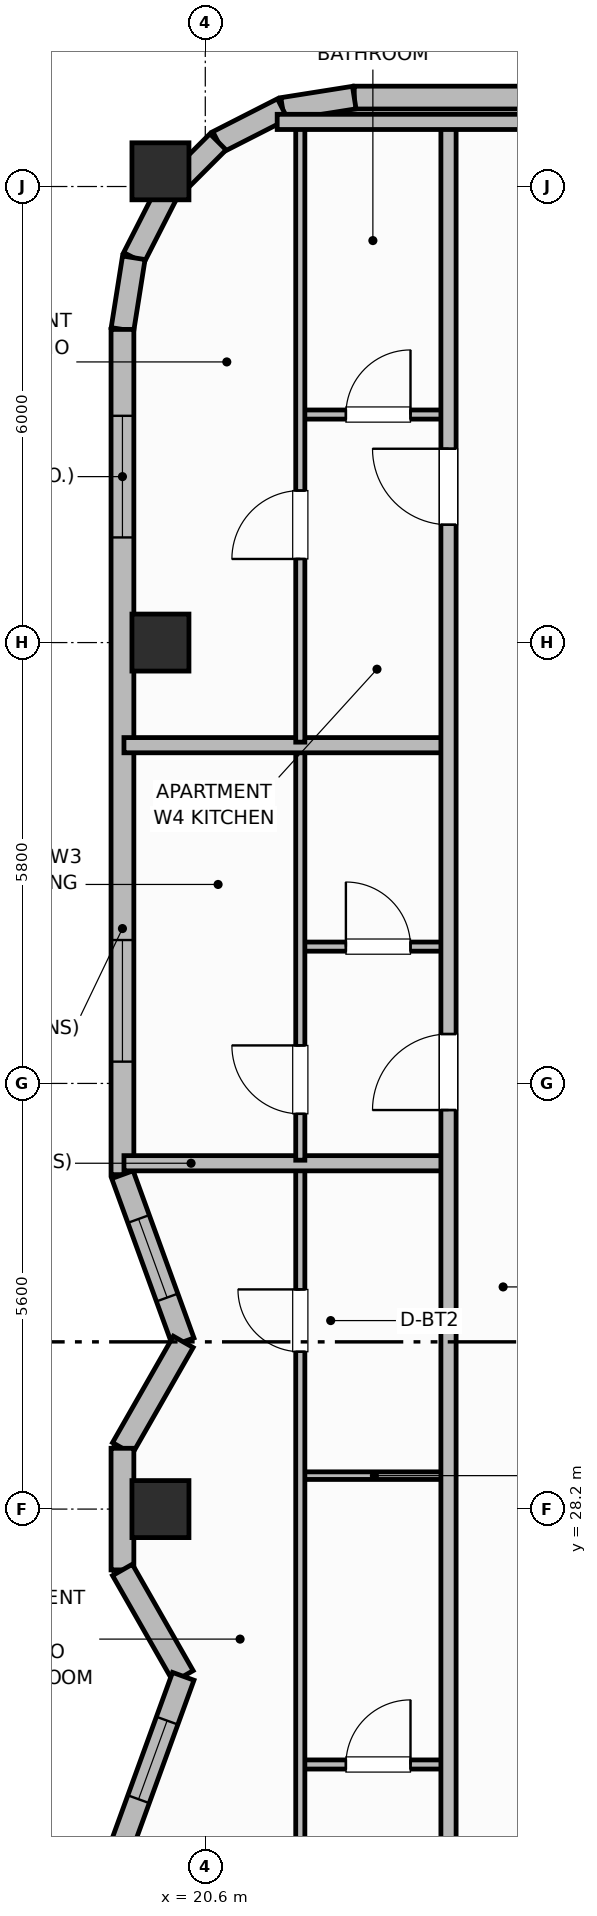
"""IFC4 building model, lengths in metres.
Left out: names, types, materials, properties, quantities, classifications, styles, units other than length and angle.
Written with IfcOpenShell. Run it as: python <this file> out.ifc"""

import sys

from ifc_helpers import new_model, si_unit, direction, frame, frame_2d, origin, origin_2d, place, context, subcontext, project, spatial, rectangle, extrude, element, fill, save


model = new_model("IFC4")
c1 = context("Model", 3, precision=1e-05, world=origin(), true_north=direction((0.0, 1.0)))
c2 = subcontext(c1, "Body", "Model", "MODEL_VIEW")
j1 = project(units=[si_unit("LENGTHUNIT", "METRE"), si_unit("PLANEANGLEUNIT", "RADIAN")], contexts=[c1])
p1 = place(None, origin())
s1 = spatial("IfcSite", under=j1, at=p1, CompositionType="ELEMENT")
p2 = place(p1, origin())
s2 = spatial("IfcBuilding", under=s1, at=p2, CompositionType="ELEMENT")
p3 = place(p2, frame((0.0, 0.0, 267.6)))
s3 = spatial("IfcBuildingStorey", under=s2, at=p3, CompositionType="ELEMENT", Elevation=267.6)
for number, where, z_axis, x_axis in (
    (1, (20.01, 28.2, 0.0), (0.0, 0.0, 1.0), (1.0, 0.0, 0.0)),
    (2, (20.01, 39.6, 0.0), (0.0, 0.0, 1.0), (1.0, 0.0, 0.0)),
    (3, (20.01, 45.8, 0.0), (0.0, 0.0, 1.0), (1.0, 0.0, 0.0)),
):
    element("IfcColumn", number, at=place(p3, frame(where, z_axis=z_axis, x_axis=x_axis)), inside=s3, PredefinedType="COLUMN", context=c2, shape_type="SweptSolid", body=[
        extrude(rectangle(XDim=0.75, YDim=0.75, at=origin_2d()), origin(), (0.0, 0.0, 1.0), 3.7),
    ])
p4 = place(p3, frame((55.84, 46.77, 0.0), z_axis=(0.0, 0.0, 1.0), x_axis=(-1.0, 0.0, 0.0)))
e4 = element("IfcWall", 4, at=p4, inside=s3, PredefinedType="SOLIDWALL", context=c2, shape_type="SweptSolid", body=[
    extrude(rectangle(XDim=33.28, YDim=0.3, at=frame_2d((16.64, 0.0))), origin(), (0.0, 0.0, 1.0), 2.73),
])
p5 = place(p4, frame((4.547, 0.0, 0.76)))
e5 = element("IfcOpeningElement", 5, at=p5, cuts=e4, PredefinedType="OPENING", context=c2, shape_type="SweptSolid", body=[
    extrude(rectangle(XDim=1.8, YDim=1.85, at=frame_2d((0.9, 0.925))), frame((0.0, 0.16, 0.0), z_axis=(0.0, -1.0, 0.0), x_axis=(1.0, 0.0, 0.0)), (0.0, 0.0, 1.0), 0.32),
])
p6 = place(p4, frame((7.745, 0.0, 0.76)))
e6 = element("IfcOpeningElement", 6, at=p6, cuts=e4, PredefinedType="OPENING", context=c2, shape_type="SweptSolid", body=[
    extrude(rectangle(XDim=1.8, YDim=1.85, at=frame_2d((0.9, 0.925))), frame((0.0, 0.16, 0.0), z_axis=(0.0, -1.0, 0.0), x_axis=(1.0, 0.0, 0.0)), (0.0, 0.0, 1.0), 0.32),
])
p7 = place(p4, frame((14.141, 0.0, 0.76)))
e7 = element("IfcOpeningElement", 7, at=p7, cuts=e4, PredefinedType="OPENING", context=c2, shape_type="SweptSolid", body=[
    extrude(rectangle(XDim=1.8, YDim=1.85, at=frame_2d((0.9, 0.925))), frame((0.0, 0.16, 0.0), z_axis=(0.0, -1.0, 0.0), x_axis=(1.0, 0.0, 0.0)), (0.0, 0.0, 1.0), 0.32),
])
p8 = place(p4, frame((17.339, 0.0, 0.76)))
e8 = element("IfcOpeningElement", 8, at=p8, cuts=e4, PredefinedType="OPENING", context=c2, shape_type="SweptSolid", body=[
    extrude(rectangle(XDim=1.8, YDim=1.85, at=frame_2d((0.9, 0.925))), frame((0.0, 0.16, 0.0), z_axis=(0.0, -1.0, 0.0), x_axis=(1.0, 0.0, 0.0)), (0.0, 0.0, 1.0), 0.32),
])
p9 = place(p4, frame((23.735, 0.0, 0.76)))
e9 = element("IfcOpeningElement", 9, at=p9, cuts=e4, PredefinedType="OPENING", context=c2, shape_type="SweptSolid", body=[
    extrude(rectangle(XDim=1.8, YDim=1.85, at=frame_2d((0.9, 0.925))), frame((0.0, 0.16, 0.0), z_axis=(0.0, -1.0, 0.0), x_axis=(1.0, 0.0, 0.0)), (0.0, 0.0, 1.0), 0.32),
])
p10 = place(p4, frame((26.933, 0.0, 0.76)))
e10 = element("IfcOpeningElement", 10, at=p10, cuts=e4, PredefinedType="OPENING", context=c2, shape_type="SweptSolid", body=[
    extrude(rectangle(XDim=1.8, YDim=1.85, at=frame_2d((0.9, 0.925))), frame((0.0, 0.16, 0.0), z_axis=(0.0, -1.0, 0.0), x_axis=(1.0, 0.0, 0.0)), (0.0, 0.0, 1.0), 0.32),
])
p11 = place(p3, frame((22.56, 46.77, 0.0), z_axis=(0.0, 0.0, 1.0), x_axis=(-0.987669453596, -0.156553666304, 0.0)))
e11 = element("IfcWall", 11, at=p11, inside=s3, PredefinedType="SOLIDWALL", context=c2, shape_type="SweptSolid", body=[
    extrude(rectangle(XDim=0.954, YDim=0.3, at=frame_2d((0.477, 0.0))), origin(), (0.0, 0.0, 1.0), 2.73),
])
p12 = place(p3, frame((21.617, 46.621, 0.0), z_axis=(0.0, 0.0, 1.0), x_axis=(-0.891023873617, -0.45395644796, 0.0)))
e12 = element("IfcWall", 12, at=p12, inside=s3, PredefinedType="SOLIDWALL", context=c2, shape_type="SweptSolid", body=[
    extrude(rectangle(XDim=0.954, YDim=0.3, at=frame_2d((0.477, 0.0))), origin(), (0.0, 0.0, 1.0), 2.73),
])
p13 = place(p3, frame((20.767, 46.188, 0.0), z_axis=(0.0, 0.0, 1.0), x_axis=(-0.707106781187, -0.707106781187, 0.0)))
e13 = element("IfcWall", 13, at=p13, inside=s3, PredefinedType="SOLIDWALL", context=c2, shape_type="SweptSolid", body=[
    extrude(rectangle(XDim=0.954, YDim=0.3, at=frame_2d((0.477, 0.0))), origin(), (0.0, 0.0, 1.0), 2.73),
])
p14 = place(p3, frame((20.093, 45.513, 0.0), z_axis=(0.0, 0.0, 1.0), x_axis=(-0.454159573051, -0.890920356825, 0.0)))
e14 = element("IfcWall", 14, at=p14, inside=s3, PredefinedType="SOLIDWALL", context=c2, shape_type="SweptSolid", body=[
    extrude(rectangle(XDim=0.954, YDim=0.3, at=frame_2d((0.477, 0.0))), origin(), (0.0, 0.0, 1.0), 2.73),
])
p15 = place(p3, frame((19.659, 44.663, 0.0), z_axis=(0.0, 0.0, 1.0), x_axis=(-0.156304114255, -0.987708977314, 0.0)))
e15 = element("IfcWall", 15, at=p15, inside=s3, PredefinedType="SOLIDWALL", context=c2, shape_type="SweptSolid", body=[
    extrude(rectangle(XDim=0.954, YDim=0.3, at=frame_2d((0.477, 0.0))), origin(), (0.0, 0.0, 1.0), 2.73),
])
p16 = place(p3, frame((19.51, 43.72, 0.0), z_axis=(0.0, 0.0, 1.0), x_axis=(0.0, -1.0, 0.0)))
e16 = element("IfcWall", 16, at=p16, inside=s3, PredefinedType="SOLIDWALL", context=c2, shape_type="SweptSolid", body=[
    extrude(rectangle(XDim=11.12, YDim=0.3, at=frame_2d((5.56, 0.0))), origin(), (0.0, 0.0, 1.0), 2.73),
])
p17 = place(p16, frame((1.137, 0.0, 0.71)))
e17 = element("IfcOpeningElement", 17, at=p17, cuts=e16, PredefinedType="OPENING", context=c2, shape_type="SweptSolid", body=[
    extrude(rectangle(XDim=1.6, YDim=1.9, at=frame_2d((0.8, 0.95))), frame((0.0, 0.16, 0.0), z_axis=(0.0, -1.0, 0.0), x_axis=(1.0, 0.0, 0.0)), (0.0, 0.0, 1.0), 0.32),
])
p18 = place(p16, frame((8.033, 0.0, 0.71)))
e18 = element("IfcOpeningElement", 18, at=p18, cuts=e16, PredefinedType="OPENING", context=c2, shape_type="SweptSolid", body=[
    extrude(rectangle(XDim=1.6, YDim=1.9, at=frame_2d((0.8, 0.95))), frame((0.0, 0.16, 0.0), z_axis=(0.0, -1.0, 0.0), x_axis=(1.0, 0.0, 0.0)), (0.0, 0.0, 1.0), 0.32),
])
p19 = place(p3, frame((19.51, 32.6, 0.0), z_axis=(0.0, 0.0, 1.0), x_axis=(0.341734690003, -0.939796468204, 0.0)))
e19 = element("IfcWall", 19, at=p19, inside=s3, PredefinedType="SOLIDWALL", context=c2, shape_type="SweptSolid", body=[
    extrude(rectangle(XDim=2.341, YDim=0.3, at=frame_2d((1.17, 0.0))), origin(), (0.0, 0.0, 1.0), 2.73),
])
p20 = place(p19, frame((0.621, 0.0, 0.92)))
e20 = element("IfcOpeningElement", 20, at=p20, cuts=e19, PredefinedType="OPENING", context=c2, shape_type="SweptSolid", body=[
    extrude(rectangle(XDim=1.1, YDim=1.65, at=frame_2d((0.55, 0.825))), frame((0.0, 0.16, 0.0), z_axis=(0.0, -1.0, 0.0), x_axis=(1.0, 0.0, 0.0)), (0.0, 0.0, 1.0), 0.32),
])
p21 = place(p3, frame((20.31, 30.4, 0.0), z_axis=(0.0, 0.0, 1.0), x_axis=(-0.496187856351, -0.868215187157, 0.0)))
e21 = element("IfcWall", 21, at=p21, inside=s3, PredefinedType="SOLIDWALL", context=c2, shape_type="SweptSolid", body=[
    extrude(rectangle(XDim=1.612, YDim=0.3, at=frame_2d((0.806, 0.0))), origin(), (0.0, 0.0, 1.0), 2.73),
])
p22 = place(p3, frame((19.51, 29.0, 0.0), z_axis=(0.0, 0.0, 1.0), x_axis=(0.0, -1.0, 0.0)))
e22 = element("IfcWall", 22, at=p22, inside=s3, PredefinedType="SOLIDWALL", context=c2, shape_type="SweptSolid", body=[
    extrude(rectangle(XDim=1.6, YDim=0.3, at=frame_2d((0.8, 0.0))), origin(), (0.0, 0.0, 1.0), 2.73),
])
p23 = place(p3, frame((19.51, 27.4, 0.0), z_axis=(0.0, 0.0, 1.0), x_axis=(0.496187856351, -0.868215187157, 0.0)))
e23 = element("IfcWall", 23, at=p23, inside=s3, PredefinedType="SOLIDWALL", context=c2, shape_type="SweptSolid", body=[
    extrude(rectangle(XDim=1.612, YDim=0.3, at=frame_2d((0.806, 0.0))), origin(), (0.0, 0.0, 1.0), 2.73),
])
p24 = place(p3, frame((20.31, 26.0, 0.0), z_axis=(0.0, 0.0, 1.0), x_axis=(-0.341768184638, -0.939784287999, 0.0)))
e24 = element("IfcWall", 24, at=p24, inside=s3, PredefinedType="SOLIDWALL", context=c2, shape_type="SweptSolid", body=[
    extrude(rectangle(XDim=2.341, YDim=0.3, at=frame_2d((1.17, 0.0))), origin(), (0.0, 0.0, 1.0), 2.73),
])
p25 = place(p24, frame((0.621, 0.0, 0.92)))
e25 = element("IfcOpeningElement", 25, at=p25, cuts=e24, PredefinedType="OPENING", context=c2, shape_type="SweptSolid", body=[
    extrude(rectangle(XDim=1.1, YDim=1.65, at=frame_2d((0.55, 0.825))), frame((0.0, 0.16, 0.0), z_axis=(0.0, -1.0, 0.0), x_axis=(1.0, 0.0, 0.0)), (0.0, 0.0, 1.0), 0.32),
])
p26 = place(p3, frame((21.85, 24.84, 0.0), z_axis=(0.0, 0.0, 1.0), x_axis=(1.0, 0.0, 0.0)))
e26 = element("IfcWall", 26, at=p26, inside=s3, PredefinedType="PARTITIONING", context=c2, shape_type="SweptSolid", body=[
    extrude(rectangle(XDim=1.95, YDim=0.12, at=frame_2d((0.975, 0.0))), origin(), (0.0, 0.0, 1.0), 2.56),
])
p27 = place(p26, frame((0.6, 0.0, 0.0)))
e27 = element("IfcOpeningElement", 27, at=p27, cuts=e26, PredefinedType="OPENING", context=c2, shape_type="SweptSolid", body=[
    extrude(rectangle(XDim=0.85, YDim=2.1, at=frame_2d((0.425, 1.05))), frame((0.0, 0.07, 0.0), z_axis=(0.0, -1.0, 0.0), x_axis=(1.0, 0.0, 0.0)), (0.0, 0.0, 1.0), 0.14),
])
p28 = place(p3, frame((21.85, 28.64, 0.0), z_axis=(0.0, 0.0, 1.0), x_axis=(1.0, 0.0, 0.0)))
e28 = element("IfcWall", 28, at=p28, inside=s3, PredefinedType="PARTITIONING", context=c2, shape_type="SweptSolid", body=[
    extrude(rectangle(XDim=1.95, YDim=0.1, at=frame_2d((0.975, 0.0))), origin(), (0.0, 0.0, 1.0), 2.56),
])
p29 = place(p3, frame((21.85, 19.48, 0.0), z_axis=(0.0, 0.0, 1.0), x_axis=(0.0, 1.0, 0.0)))
e29 = element("IfcWall", 29, at=p29, inside=s3, PredefinedType="PARTITIONING", context=c2, shape_type="SweptSolid", body=[
    extrude(rectangle(XDim=13.23, YDim=0.12, at=frame_2d((6.615, 0.0))), origin(), (0.0, 0.0, 1.0), 2.56),
])
p30 = place(p29, frame((0.61, 0.0, 0.0)))
e30 = element("IfcOpeningElement", 30, at=p30, cuts=e29, PredefinedType="OPENING", context=c2, shape_type="SweptSolid", body=[
    extrude(rectangle(XDim=0.9, YDim=2.1, at=frame_2d((0.45, 1.05))), frame((0.0, 0.07, 0.0), z_axis=(0.0, -1.0, 0.0), x_axis=(1.0, 0.0, 0.0)), (0.0, 0.0, 1.0), 0.14),
])
p31 = place(p29, frame((10.79, 0.0, 0.0)))
e31 = element("IfcOpeningElement", 31, at=p31, cuts=e29, PredefinedType="OPENING", context=c2, shape_type="SweptSolid", body=[
    extrude(rectangle(XDim=0.82, YDim=2.08, at=frame_2d((0.41, 1.04))), frame((0.0, 0.07, 0.0), z_axis=(0.0, -1.0, 0.0), x_axis=(1.0, 0.0, 0.0)), (0.0, 0.0, 1.0), 0.14),
])
p32 = place(p3, frame((19.53, 32.75, 0.0), z_axis=(0.0, 0.0, 1.0), x_axis=(1.0, 0.0, 0.0)))
e32 = element("IfcWall", 32, at=p32, inside=s3, PredefinedType="PARTITIONING", context=c2, shape_type="SweptSolid", body=[
    extrude(rectangle(XDim=4.27, YDim=0.2, at=frame_2d((2.135, 0.0))), origin(), (0.0, 0.0, 1.0), 2.56),
])
p33 = place(p3, frame((21.85, 35.6, 0.0), z_axis=(0.0, 0.0, 1.0), x_axis=(1.0, 0.0, 0.0)))
e33 = element("IfcWall", 33, at=p33, inside=s3, PredefinedType="PARTITIONING", context=c2, shape_type="SweptSolid", body=[
    extrude(rectangle(XDim=1.95, YDim=0.12, at=frame_2d((0.975, 0.0))), origin(), (0.0, 0.0, 1.0), 2.56),
])
p34 = place(p33, frame((0.6, 0.0, 0.0)))
e34 = element("IfcOpeningElement", 34, at=p34, cuts=e33, PredefinedType="OPENING", context=c2, shape_type="SweptSolid", body=[
    extrude(rectangle(XDim=0.85, YDim=2.1, at=frame_2d((0.425, 1.05))), frame((0.0, 0.07, 0.0), z_axis=(0.0, -1.0, 0.0), x_axis=(1.0, 0.0, 0.0)), (0.0, 0.0, 1.0), 0.14),
])
p35 = place(p3, frame((21.85, 32.79, 0.0), z_axis=(0.0, 0.0, 1.0), x_axis=(0.0, 1.0, 0.0)))
e35 = element("IfcWall", 35, at=p35, inside=s3, PredefinedType="PARTITIONING", context=c2, shape_type="SweptSolid", body=[
    extrude(rectangle(XDim=5.42, YDim=0.12, at=frame_2d((2.71, 0.0))), origin(), (0.0, 0.0, 1.0), 2.56),
])
p36 = place(p35, frame((0.61, 0.0, 0.0)))
e36 = element("IfcOpeningElement", 36, at=p36, cuts=e35, PredefinedType="OPENING", context=c2, shape_type="SweptSolid", body=[
    extrude(rectangle(XDim=0.9, YDim=2.1, at=frame_2d((0.45, 1.05))), frame((0.0, 0.07, 0.0), z_axis=(0.0, -1.0, 0.0), x_axis=(1.0, 0.0, 0.0)), (0.0, 0.0, 1.0), 0.14),
])
p37 = place(p3, frame((19.53, 38.25, 0.0), z_axis=(0.0, 0.0, 1.0), x_axis=(1.0, 0.0, 0.0)))
e37 = element("IfcWall", 37, at=p37, inside=s3, PredefinedType="PARTITIONING", context=c2, shape_type="SweptSolid", body=[
    extrude(rectangle(XDim=4.27, YDim=0.2, at=frame_2d((2.135, 0.0))), origin(), (0.0, 0.0, 1.0), 2.56),
])
p38 = place(p3, frame((21.85, 42.6, 0.0), z_axis=(0.0, 0.0, 1.0), x_axis=(1.0, 0.0, 0.0)))
e38 = element("IfcWall", 38, at=p38, inside=s3, PredefinedType="PARTITIONING", context=c2, shape_type="SweptSolid", body=[
    extrude(rectangle(XDim=1.95, YDim=0.12, at=frame_2d((0.975, 0.0))), origin(), (0.0, 0.0, 1.0), 2.56),
])
p39 = place(p38, frame((0.6, 0.0, 0.0)))
e39 = element("IfcOpeningElement", 39, at=p39, cuts=e38, PredefinedType="OPENING", context=c2, shape_type="SweptSolid", body=[
    extrude(rectangle(XDim=0.85, YDim=2.1, at=frame_2d((0.425, 1.05))), frame((0.0, 0.07, 0.0), z_axis=(0.0, -1.0, 0.0), x_axis=(1.0, 0.0, 0.0)), (0.0, 0.0, 1.0), 0.14),
])
p40 = place(p3, frame((21.85, 38.29, 0.0), z_axis=(0.0, 0.0, 1.0), x_axis=(0.0, 1.0, 0.0)))
e40 = element("IfcWall", 40, at=p40, inside=s3, PredefinedType="PARTITIONING", context=c2, shape_type="SweptSolid", body=[
    extrude(rectangle(XDim=8.12, YDim=0.12, at=frame_2d((4.06, 0.0))), origin(), (0.0, 0.0, 1.0), 2.56),
])
p41 = place(p40, frame((2.41, 0.0, 0.0)))
e41 = element("IfcOpeningElement", 41, at=p41, cuts=e40, PredefinedType="OPENING", context=c2, shape_type="SweptSolid", body=[
    extrude(rectangle(XDim=0.9, YDim=2.1, at=frame_2d((0.45, 1.05))), frame((0.0, 0.07, 0.0), z_axis=(0.0, -1.0, 0.0), x_axis=(1.0, 0.0, 0.0)), (0.0, 0.0, 1.0), 0.14),
])
p42 = place(p3, frame((23.8, 9.95, 0.0), z_axis=(0.0, 0.0, 1.0), x_axis=(0.0, 1.0, 0.0)))
e42 = element("IfcWall", 42, at=p42, inside=s3, PredefinedType="PARTITIONING", context=c2, shape_type="SweptSolid", body=[
    extrude(rectangle(XDim=36.5, YDim=0.2, at=frame_2d((18.25, 0.0))), origin(), (0.0, 0.0, 1.0), 2.56),
])
p43 = place(p42, frame((3.11, 0.0, 0.0)))
e43 = element("IfcOpeningElement", 43, at=p43, cuts=e42, PredefinedType="OPENING", context=c2, shape_type="SweptSolid", body=[
    extrude(rectangle(XDim=1.0, YDim=2.15, at=frame_2d((0.5, 1.075))), frame((0.0, 0.11, 0.0), z_axis=(0.0, -1.0, 0.0), x_axis=(1.0, 0.0, 0.0)), (0.0, 0.0, 1.0), 0.22),
])
p44 = place(p42, frame((11.99, 0.0, 0.0)))
e44 = element("IfcOpeningElement", 44, at=p44, cuts=e42, PredefinedType="OPENING", context=c2, shape_type="SweptSolid", body=[
    extrude(rectangle(XDim=1.0, YDim=2.15, at=frame_2d((0.5, 1.075))), frame((0.0, 0.11, 0.0), z_axis=(0.0, -1.0, 0.0), x_axis=(1.0, 0.0, 0.0)), (0.0, 0.0, 1.0), 0.22),
])
p45 = place(p42, frame((23.5, 0.0, 0.0)))
e45 = element("IfcOpeningElement", 45, at=p45, cuts=e42, PredefinedType="OPENING", context=c2, shape_type="SweptSolid", body=[
    extrude(rectangle(XDim=1.0, YDim=2.15, at=frame_2d((0.5, 1.075))), frame((0.0, 0.11, 0.0), z_axis=(0.0, -1.0, 0.0), x_axis=(1.0, 0.0, 0.0)), (0.0, 0.0, 1.0), 0.22),
])
p46 = place(p42, frame((31.2, 0.0, 0.0)))
e46 = element("IfcOpeningElement", 46, at=p46, cuts=e42, PredefinedType="OPENING", context=c2, shape_type="SweptSolid", body=[
    extrude(rectangle(XDim=1.0, YDim=2.15, at=frame_2d((0.5, 1.075))), frame((0.0, 0.11, 0.0), z_axis=(0.0, -1.0, 0.0), x_axis=(1.0, 0.0, 0.0)), (0.0, 0.0, 1.0), 0.22),
])
p47 = place(p3, frame((21.546, 46.45, 0.0), z_axis=(0.0, 0.0, 1.0), x_axis=(1.0, 0.0, 0.0)))
e47 = element("IfcWall", 47, at=p47, inside=s3, PredefinedType="PARTITIONING", context=c2, shape_type="SweptSolid", body=[
    extrude(rectangle(XDim=3.754, YDim=0.2, at=frame_2d((1.877, 0.0))), origin(), (0.0, 0.0, 1.0), 2.56),
])
p48 = place(p17, origin())
e48 = element("IfcWindow", 48, at=p48, inside=s3, PartitioningType="SINGLE_PANEL", PredefinedType="WINDOW", context=c2, shape_type="SweptSolid", body=[
    extrude(rectangle(XDim=1.6, YDim=1.9, at=frame_2d((0.8, 0.95))), frame((0.0, 0.03, 0.0), z_axis=(0.0, -1.0, 0.0), x_axis=(1.0, 0.0, 0.0)), (0.0, 0.0, 1.0), 0.06),
])
fill(e17, e48)
p49 = place(p18, origin())
e49 = element("IfcWindow", 49, at=p49, inside=s3, PartitioningType="SINGLE_PANEL", PredefinedType="WINDOW", context=c2, shape_type="SweptSolid", body=[
    extrude(rectangle(XDim=1.6, YDim=1.9, at=frame_2d((0.8, 0.95))), frame((0.0, 0.03, 0.0), z_axis=(0.0, -1.0, 0.0), x_axis=(1.0, 0.0, 0.0)), (0.0, 0.0, 1.0), 0.06),
])
fill(e18, e49)
p50 = place(p20, origin())
e50 = element("IfcWindow", 50, at=p50, inside=s3, PartitioningType="SINGLE_PANEL", PredefinedType="WINDOW", context=c2, shape_type="SweptSolid", body=[
    extrude(rectangle(XDim=1.1, YDim=1.65, at=frame_2d((0.55, 0.825))), frame((0.0, 0.03, 0.0), z_axis=(0.0, -1.0, 0.0), x_axis=(1.0, 0.0, 0.0)), (0.0, 0.0, 1.0), 0.06),
])
fill(e20, e50)
p51 = place(p25, origin())
e51 = element("IfcWindow", 51, at=p51, inside=s3, PartitioningType="SINGLE_PANEL", PredefinedType="WINDOW", context=c2, shape_type="SweptSolid", body=[
    extrude(rectangle(XDim=1.1, YDim=1.65, at=frame_2d((0.55, 0.825))), frame((0.0, 0.03, 0.0), z_axis=(0.0, -1.0, 0.0), x_axis=(1.0, 0.0, 0.0)), (0.0, 0.0, 1.0), 0.06),
])
fill(e25, e51)
p52 = place(p27, origin())
e52 = element("IfcDoor", 52, at=p52, inside=s3, OperationType="SINGLE_SWING_RIGHT", PredefinedType="DOOR", context=c2, shape_type="SweptSolid", body=[
    extrude(rectangle(XDim=0.85, YDim=2.1, at=frame_2d((0.425, 1.05))), frame((0.0, 0.025, 0.0), z_axis=(0.0, -1.0, 0.0), x_axis=(1.0, 0.0, 0.0)), (0.0, 0.0, 1.0), 0.05),
])
fill(e27, e52)
p53 = place(p31, origin())
e53 = element("IfcDoor", 53, at=p53, inside=s3, OperationType="SINGLE_SWING_RIGHT", PredefinedType="DOOR", context=c2, shape_type="SweptSolid", body=[
    extrude(rectangle(XDim=0.82, YDim=2.08, at=frame_2d((0.41, 1.04))), frame((0.0, 0.025, 0.0), z_axis=(0.0, -1.0, 0.0), x_axis=(1.0, 0.0, 0.0)), (0.0, 0.0, 1.0), 0.05),
])
fill(e31, e53)
p54 = place(p34, origin())
e54 = element("IfcDoor", 54, at=p54, inside=s3, OperationType="SINGLE_SWING_LEFT", PredefinedType="DOOR", context=c2, shape_type="SweptSolid", body=[
    extrude(rectangle(XDim=0.85, YDim=2.1, at=frame_2d((0.425, 1.05))), frame((0.0, 0.025, 0.0), z_axis=(0.0, -1.0, 0.0), x_axis=(1.0, 0.0, 0.0)), (0.0, 0.0, 1.0), 0.05),
])
fill(e34, e54)
p55 = place(p36, origin())
e55 = element("IfcDoor", 55, at=p55, inside=s3, OperationType="SINGLE_SWING_RIGHT", PredefinedType="DOOR", context=c2, shape_type="SweptSolid", body=[
    extrude(rectangle(XDim=0.9, YDim=2.1, at=frame_2d((0.45, 1.05))), frame((0.0, 0.025, 0.0), z_axis=(0.0, -1.0, 0.0), x_axis=(1.0, 0.0, 0.0)), (0.0, 0.0, 1.0), 0.05),
])
fill(e36, e55)
p56 = place(p39, origin())
e56 = element("IfcDoor", 56, at=p56, inside=s3, OperationType="SINGLE_SWING_RIGHT", PredefinedType="DOOR", context=c2, shape_type="SweptSolid", body=[
    extrude(rectangle(XDim=0.85, YDim=2.1, at=frame_2d((0.425, 1.05))), frame((0.0, 0.025, 0.0), z_axis=(0.0, -1.0, 0.0), x_axis=(1.0, 0.0, 0.0)), (0.0, 0.0, 1.0), 0.05),
])
fill(e39, e56)
p57 = place(p41, origin())
e57 = element("IfcDoor", 57, at=p57, inside=s3, OperationType="SINGLE_SWING_LEFT", PredefinedType="DOOR", context=c2, shape_type="SweptSolid", body=[
    extrude(rectangle(XDim=0.9, YDim=2.1, at=frame_2d((0.45, 1.05))), frame((0.0, 0.025, 0.0), z_axis=(0.0, -1.0, 0.0), x_axis=(1.0, 0.0, 0.0)), (0.0, 0.0, 1.0), 0.05),
])
fill(e41, e57)
p58 = place(p45, origin())
e58 = element("IfcDoor", 58, at=p58, inside=s3, OperationType="SINGLE_SWING_LEFT", PredefinedType="DOOR", context=c2, shape_type="SweptSolid", body=[
    extrude(rectangle(XDim=1.0, YDim=2.15, at=frame_2d((0.5, 1.075))), frame((0.0, 0.025, 0.0), z_axis=(0.0, -1.0, 0.0), x_axis=(1.0, 0.0, 0.0)), (0.0, 0.0, 1.0), 0.05),
])
fill(e45, e58)
p59 = place(p46, origin())
e59 = element("IfcDoor", 59, at=p59, inside=s3, OperationType="SINGLE_SWING_RIGHT", PredefinedType="DOOR", context=c2, shape_type="SweptSolid", body=[
    extrude(rectangle(XDim=1.0, YDim=2.15, at=frame_2d((0.5, 1.075))), frame((0.0, 0.025, 0.0), z_axis=(0.0, -1.0, 0.0), x_axis=(1.0, 0.0, 0.0)), (0.0, 0.0, 1.0), 0.05),
])
fill(e46, e59)
save(model, sys.argv[1])
